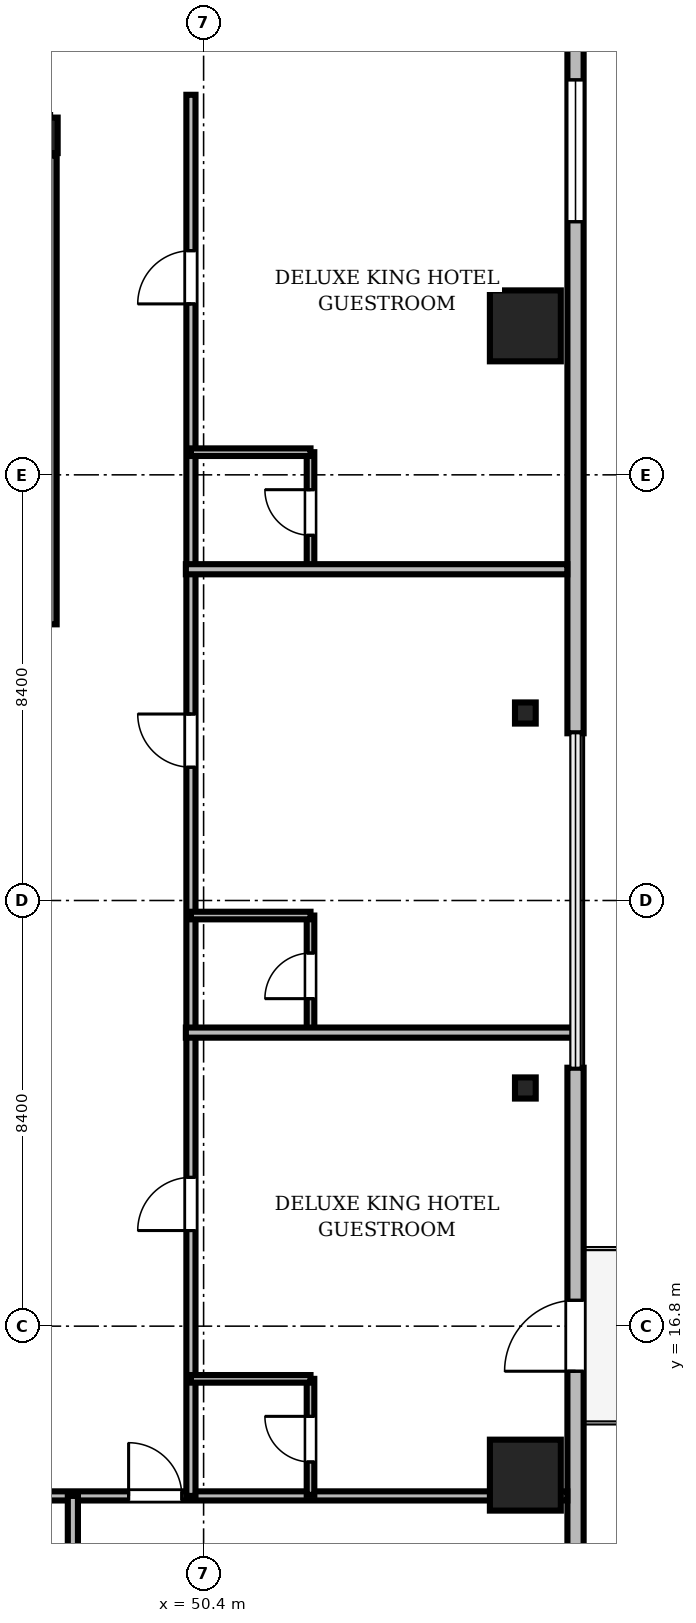
"""IFC4 building model, lengths in metres.
Left out: names, types, materials, properties, quantities, classifications, styles, units other than length and angle.
Written with IfcOpenShell. Run it as: python <this file> out.ifc"""

import sys

from ifc_helpers import new_model, si_unit, direction, frame, frame_2d, origin, origin_2d, place, context, subcontext, project, spatial, rectangle, i_section, extrude, source, transform, mapped, element, fill, save


model = new_model("IFC4")
c1 = context("Model", 3, precision=1e-05, world=origin(), true_north=direction((0.0, 1.0)))
c2 = subcontext(c1, "Body", "Model", "MODEL_VIEW")
j1 = project(units=[si_unit("LENGTHUNIT", "METRE"), si_unit("PLANEANGLEUNIT", "RADIAN")], contexts=[c1])
p1 = place(None, origin())
s1 = spatial("IfcSite", under=j1, at=p1, CompositionType="ELEMENT")
p2 = place(p1, origin())
s2 = spatial("IfcBuilding", under=s1, at=p2, CompositionType="ELEMENT")
p3 = place(p2, frame((0.0, 0.0, 203.55)))
s3 = spatial("IfcBuildingStorey", under=s2, at=p3, CompositionType="ELEMENT", Elevation=203.55)
m1 = source(origin(), c2, "Body", "SweptSolid", [
    extrude(i_section(OverallWidth=0.3, OverallDepth=0.7, WebThickness=0.017, FlangeThickness=0.032, FilletRadius=0.027, at=origin_2d()), origin(), (0.0, 0.0, 1.0), 3.53),
])
p4 = place(p3, frame((47.37, 40.3, 0.0), z_axis=(0.0, 0.0, 1.0), x_axis=(1.0, 0.0, 0.0)))
e1 = element("IfcColumn", 1, at=p4, inside=s3, PredefinedType="COLUMN", context=c2, shape_type="MappedRepresentation", body=[
    mapped(m1, transform((0.0, 0.0, 0.0), scale=1.0)),
])
m2 = source(origin(), c2, "Body", "SweptSolid", [
    extrude(rectangle(XDim=1.4, YDim=1.4, at=origin_2d()), origin(), (0.0, 0.0, 1.0), 3.53),
])
for number, where, z_axis, x_axis in (
    (2, (56.75, 13.86, 0.0), (0.0, 0.0, 1.0), (1.0, 0.0, 0.0)),
    (3, (56.75, 36.54, 0.0), (0.0, 0.0, 1.0), (1.0, 0.0, 0.0)),
):
    element("IfcColumn", number, at=place(p3, frame(where, z_axis=z_axis, x_axis=x_axis)), inside=s3, PredefinedType="COLUMN", context=c2, shape_type="MappedRepresentation", body=[
        mapped(m2, transform((0.0, 0.0, 0.0), scale=1.0)),
    ])
m3 = source(origin(), c2, "Body", "SweptSolid", [
    extrude(i_section(OverallWidth=0.409, OverallDepth=0.417, WebThickness=0.021, FlangeThickness=0.033, FilletRadius=0.015, at=origin_2d()), origin(), (0.0, 0.0, 1.0), 3.53),
])
for number, where, z_axis, x_axis in (
    (4, (56.75, 21.5, 0.0), (0.0, 0.0, 1.0), (1.0, 0.0, 0.0)),
    (5, (56.75, 28.9, 0.0), (0.0, 0.0, 1.0), (1.0, 0.0, 0.0)),
):
    element("IfcColumn", number, at=place(p3, frame(where, z_axis=z_axis, x_axis=x_axis)), inside=s3, PredefinedType="COLUMN", context=c2, shape_type="MappedRepresentation", body=[
        mapped(m3, transform((0.0, 0.0, 0.0), scale=1.0)),
    ])
m4 = source(origin(), c2, "Body", "SweptSolid", [
    extrude(rectangle(XDim=15.6, YDim=0.32, at=frame_2d((7.8, 0.0))), origin(), (0.0, 0.0, 1.0), 3.53),
])
p5 = place(p3, frame((57.74, 6.3, 0.0), z_axis=(0.0, 0.0, 1.0), x_axis=(0.0, 1.0, 0.0)))
e6 = element("IfcWall", 6, at=p5, inside=s3, PredefinedType="SOLIDWALL", context=c2, shape_type="MappedRepresentation", body=[
    mapped(m4, transform((0.0, 0.0, 0.0), scale=1.0)),
])
m5 = source(origin(), c2, "Body", "SweptSolid", [
    extrude(rectangle(XDim=1.4, YDim=2.3, at=frame_2d((0.7, 1.15))), frame((0.0, 0.17, 0.0), z_axis=(0.0, -1.0, 0.0), x_axis=(1.0, 0.0, 0.0)), (0.0, 0.0, 1.0), 0.34),
])
p6 = place(p5, frame((9.61, 0.0, 0.0)))
e7 = element("IfcOpeningElement", 7, at=p6, cuts=e6, PredefinedType="OPENING", context=c2, shape_type="MappedRepresentation", body=[
    mapped(m5, transform((0.0, 0.0, 0.0), scale=1.0)),
])
m6 = source(origin(), c2, "Body", "SweptSolid", [
    extrude(rectangle(XDim=2.8, YDim=2.4, at=frame_2d((1.4, 1.2))), frame((0.0, 0.17, 0.0), z_axis=(0.0, -1.0, 0.0), x_axis=(1.0, 0.0, 0.0)), (0.0, 0.0, 1.0), 0.34),
])
p7 = place(p5, frame((2.705, 0.0, 0.72)))
e8 = element("IfcOpeningElement", 8, at=p7, cuts=e6, PredefinedType="OPENING", context=c2, shape_type="MappedRepresentation", body=[
    mapped(m6, transform((0.0, 0.0, 0.0), scale=1.0)),
])
m7 = source(origin(), c2, "Body", "SweptSolid", [
    extrude(rectangle(XDim=15.6, YDim=0.32, at=frame_2d((7.8, 0.0))), origin(), (0.0, 0.0, 1.0), 3.53),
])
p8 = place(p3, frame((57.74, 28.5, 0.0), z_axis=(0.0, 0.0, 1.0), x_axis=(0.0, 1.0, 0.0)))
e9 = element("IfcWall", 9, at=p8, inside=s3, PredefinedType="SOLIDWALL", context=c2, shape_type="MappedRepresentation", body=[
    mapped(m7, transform((0.0, 0.0, 0.0), scale=1.0)),
])
p9 = place(p8, frame((10.095, 0.0, 0.72)))
e10 = element("IfcOpeningElement", 10, at=p9, cuts=e9, PredefinedType="OPENING", context=c2, shape_type="MappedRepresentation", body=[
    mapped(m6, transform((0.0, 0.0, 0.0), scale=1.0)),
])
m8 = source(origin(), c2, "Body", "SweptSolid", [
    extrude(rectangle(XDim=9.25, YDim=0.25, at=frame_2d((4.625, 0.0))), origin(), (0.0, 0.0, 1.0), 3.55),
])
p10 = place(p3, frame((47.375, 30.65, 0.0), z_axis=(0.0, 0.0, 1.0), x_axis=(0.0, 1.0, 0.0)))
e11 = element("IfcWall", 11, at=p10, inside=s3, PredefinedType="SOLIDWALL", context=c2, shape_type="MappedRepresentation", body=[
    mapped(m8, transform((0.0, 0.0, 0.0), scale=1.0)),
])
m9 = source(origin(), c2, "Body", "SweptSolid", [
    extrude(rectangle(XDim=46.156, YDim=0.18, at=frame_2d((23.078, 0.0))), origin(), (0.0, 0.0, 1.0), 2.772),
])
p11 = place(p3, frame((11.422, 13.45, 0.0), z_axis=(0.0, 0.0, 1.0), x_axis=(1.0, 0.0, 0.0)))
e12 = element("IfcWall", 12, at=p11, inside=s3, PredefinedType="PARTITIONING", context=c2, shape_type="MappedRepresentation", body=[
    mapped(m9, transform((0.0, 0.0, 0.0), scale=1.0)),
])
m10 = source(origin(), c2, "Body", "SweptSolid", [
    extrude(rectangle(XDim=1.05, YDim=2.2, at=frame_2d((0.525, 1.1))), frame((0.0, 0.1, 0.0), z_axis=(0.0, -1.0, 0.0), x_axis=(1.0, 0.0, 0.0)), (0.0, 0.0, 1.0), 0.2),
])
p12 = place(p11, frame((11.118, 0.0, 0.0)))
e13 = element("IfcOpeningElement", 13, at=p12, cuts=e12, PredefinedType="OPENING", context=c2, shape_type="MappedRepresentation", body=[
    mapped(m10, transform((0.0, 0.0, 0.0), scale=1.0)),
])
p13 = place(p11, frame((14.939, 0.0, 0.0)))
e14 = element("IfcOpeningElement", 14, at=p13, cuts=e12, PredefinedType="OPENING", context=c2, shape_type="MappedRepresentation", body=[
    mapped(m10, transform((0.0, 0.0, 0.0), scale=1.0)),
])
p14 = place(p11, frame((20.922, 0.0, 0.0)))
e15 = element("IfcOpeningElement", 15, at=p14, cuts=e12, PredefinedType="OPENING", context=c2, shape_type="MappedRepresentation", body=[
    mapped(m10, transform((0.0, 0.0, 0.0), scale=1.0)),
])
p15 = place(p11, frame((26.904, 0.0, 0.0)))
e16 = element("IfcOpeningElement", 16, at=p15, cuts=e12, PredefinedType="OPENING", context=c2, shape_type="MappedRepresentation", body=[
    mapped(m10, transform((0.0, 0.0, 0.0), scale=1.0)),
])
p16 = place(p11, frame((32.887, 0.0, 0.0)))
e17 = element("IfcOpeningElement", 17, at=p16, cuts=e12, PredefinedType="OPENING", context=c2, shape_type="MappedRepresentation", body=[
    mapped(m10, transform((0.0, 0.0, 0.0), scale=1.0)),
])
p17 = place(p11, frame((37.498, 0.0, 0.0)))
e18 = element("IfcOpeningElement", 18, at=p17, cuts=e12, PredefinedType="OPENING", context=c2, shape_type="MappedRepresentation", body=[
    mapped(m10, transform((0.0, 0.0, 0.0), scale=1.0)),
])
m11 = source(origin(), c2, "Body", "SweptSolid", [
    extrude(rectangle(XDim=27.65, YDim=0.18, at=frame_2d((13.825, 0.0))), origin(), (0.0, 0.0, 1.0), 2.972),
])
p18 = place(p3, frame((50.15, 13.45, 0.0), z_axis=(0.0, 0.0, 1.0), x_axis=(0.0, 1.0, 0.0)))
e19 = element("IfcWall", 19, at=p18, inside=s3, PredefinedType="PARTITIONING", context=c2, shape_type="MappedRepresentation", body=[
    mapped(m11, transform((0.0, 0.0, 0.0), scale=1.0)),
])
p19 = place(p18, frame((5.237, 0.0, 0.0)))
e20 = element("IfcOpeningElement", 20, at=p19, cuts=e19, PredefinedType="OPENING", context=c2, shape_type="MappedRepresentation", body=[
    mapped(m10, transform((0.0, 0.0, 0.0), scale=1.0)),
])
p20 = place(p18, frame((14.38, 0.0, 0.0)))
e21 = element("IfcOpeningElement", 21, at=p20, cuts=e19, PredefinedType="OPENING", context=c2, shape_type="MappedRepresentation", body=[
    mapped(m10, transform((0.0, 0.0, 0.0), scale=1.0)),
])
p21 = place(p18, frame((23.523, 0.0, 0.0)))
e22 = element("IfcOpeningElement", 22, at=p21, cuts=e19, PredefinedType="OPENING", context=c2, shape_type="MappedRepresentation", body=[
    mapped(m10, transform((0.0, 0.0, 0.0), scale=1.0)),
])
m12 = source(origin(), c2, "Body", "SweptSolid", [
    extrude(rectangle(XDim=2.29, YDim=0.15, at=frame_2d((1.145, 0.0))), origin(), (0.0, 0.0, 1.0), 2.972),
])
p22 = place(p3, frame((52.51, 13.47, 0.0), z_axis=(0.0, 0.0, 1.0), x_axis=(0.0, 1.0, 0.0)))
e23 = element("IfcWall", 23, at=p22, inside=s3, PredefinedType="PARTITIONING", context=c2, shape_type="MappedRepresentation", body=[
    mapped(m12, transform((0.0, 0.0, 0.0), scale=1.0)),
])
m13 = source(origin(), c2, "Body", "SweptSolid", [
    extrude(rectangle(XDim=0.9, YDim=2.1, at=frame_2d((0.45, 1.05))), frame((0.0, 0.085, 0.0), z_axis=(0.0, -1.0, 0.0), x_axis=(1.0, 0.0, 0.0)), (0.0, 0.0, 1.0), 0.17),
])
p23 = place(p22, frame((0.65, 0.0, 0.0)))
e24 = element("IfcOpeningElement", 24, at=p23, cuts=e23, PredefinedType="OPENING", context=c2, shape_type="MappedRepresentation", body=[
    mapped(m13, transform((0.0, 0.0, 0.0), scale=1.0)),
])
m14 = source(origin(), c2, "Body", "SweptSolid", [
    extrude(rectangle(XDim=2.29, YDim=0.15, at=frame_2d((1.145, 0.0))), origin(), (0.0, 0.0, 1.0), 3.192),
])
p24 = place(p3, frame((52.51, 22.613, 0.0), z_axis=(0.0, 0.0, 1.0), x_axis=(0.0, 1.0, 0.0)))
e25 = element("IfcWall", 25, at=p24, inside=s3, PredefinedType="PARTITIONING", context=c2, shape_type="MappedRepresentation", body=[
    mapped(m14, transform((0.0, 0.0, 0.0), scale=1.0)),
])
p25 = place(p24, frame((0.65, 0.0, 0.0)))
e26 = element("IfcOpeningElement", 26, at=p25, cuts=e25, PredefinedType="OPENING", context=c2, shape_type="MappedRepresentation", body=[
    mapped(m13, transform((0.0, 0.0, 0.0), scale=1.0)),
])
m15 = source(origin(), c2, "Body", "SweptSolid", [
    extrude(rectangle(XDim=2.29, YDim=0.15, at=frame_2d((1.145, 0.0))), origin(), (0.0, 0.0, 1.0), 3.53),
])
p26 = place(p3, frame((52.51, 31.757, 0.0), z_axis=(0.0, 0.0, 1.0), x_axis=(0.0, 1.0, 0.0)))
e27 = element("IfcWall", 27, at=p26, inside=s3, PredefinedType="PARTITIONING", context=c2, shape_type="MappedRepresentation", body=[
    mapped(m15, transform((0.0, 0.0, 0.0), scale=1.0)),
])
p27 = place(p26, frame((0.65, 0.0, 0.0)))
e28 = element("IfcOpeningElement", 28, at=p27, cuts=e27, PredefinedType="OPENING", context=c2, shape_type="MappedRepresentation", body=[
    mapped(m13, transform((0.0, 0.0, 0.0), scale=1.0)),
])
m16 = source(origin(), c2, "Body", "SweptSolid", [
    extrude(rectangle(XDim=11.328, YDim=0.2, at=frame_2d((5.664, 0.0))), origin(), (0.0, 0.0, 1.0), 2.772),
])
p28 = place(p3, frame((47.82, 2.122, 0.0), z_axis=(0.0, 0.0, 1.0), x_axis=(0.0, 1.0, 0.0)))
e29 = element("IfcWall", 29, at=p28, inside=s3, PredefinedType="PARTITIONING", context=c2, shape_type="MappedRepresentation", body=[
    mapped(m16, transform((0.0, 0.0, 0.0), scale=1.0)),
])
m17 = source(origin(), c2, "Body", "SweptSolid", [
    extrude(rectangle(XDim=7.72, YDim=0.2, at=frame_2d((3.86, 0.0))), origin(), (0.0, 0.0, 1.0), 2.772),
])
p29 = place(p3, frame((50.05, 22.593, 0.0), z_axis=(0.0, 0.0, 1.0), x_axis=(1.0, 0.0, 0.0)))
e30 = element("IfcWall", 30, at=p29, inside=s3, PredefinedType="PARTITIONING", context=c2, shape_type="MappedRepresentation", body=[
    mapped(m17, transform((0.0, 0.0, 0.0), scale=1.0)),
])
m18 = source(origin(), c2, "Body", "SweptSolid", [
    extrude(rectangle(XDim=7.528, YDim=0.2, at=frame_2d((3.764, 0.0))), origin(), (0.0, 0.0, 1.0), 2.772),
])
p30 = place(p3, frame((50.05, 31.737, 0.0), z_axis=(0.0, 0.0, 1.0), x_axis=(1.0, 0.0, 0.0)))
e31 = element("IfcWall", 31, at=p30, inside=s3, PredefinedType="PARTITIONING", context=c2, shape_type="MappedRepresentation", body=[
    mapped(m18, transform((0.0, 0.0, 0.0), scale=1.0)),
])
m19 = source(origin(), c2, "Body", "SweptSolid", [
    extrude(rectangle(XDim=2.36, YDim=0.15, at=frame_2d((1.18, 0.0))), origin(), (0.0, 0.0, 1.0), 3.53),
])
for number, where, z_axis, x_axis in (
    (32, (50.15, 15.76, 0.0), (0.0, 0.0, 1.0), (1.0, 0.0, 0.0)),
    (33, (50.15, 24.903, 0.0), (0.0, 0.0, 1.0), (1.0, 0.0, 0.0)),
    (34, (50.15, 34.047, 0.0), (0.0, 0.0, 1.0), (1.0, 0.0, 0.0)),
):
    element("IfcWall", number, at=place(p3, frame(where, z_axis=z_axis, x_axis=x_axis)), inside=s3, PredefinedType="PARTITIONING", context=c2, shape_type="MappedRepresentation", body=[
        mapped(m19, transform((0.0, 0.0, 0.0), scale=1.0)),
    ])
m20 = source(origin(), c2, "Body", "SweptSolid", [
    extrude(rectangle(XDim=1.4, YDim=2.3, at=frame_2d((0.7, 1.15))), frame((0.0, 0.025, 0.0), z_axis=(0.0, -1.0, 0.0), x_axis=(1.0, 0.0, 0.0)), (0.0, 0.0, 1.0), 0.05),
])
p31 = place(p6, frame((1.4, 0.0, 0.0), z_axis=(0.0, 0.0, 1.0), x_axis=(-1.0, 0.0, 0.0)))
e35 = element("IfcDoor", 35, at=p31, inside=s3, OperationType="DOUBLE_DOOR_SLIDING", PredefinedType="DOOR", context=c2, shape_type="MappedRepresentation", body=[
    mapped(m20, transform((0.0, 0.0, 0.0), scale=1.0)),
])
fill(e7, e35)
m21 = source(origin(), c2, "Body", "SweptSolid", [
    extrude(rectangle(XDim=2.8, YDim=2.4, at=frame_2d((1.4, 1.2))), frame((0.0, 0.03, 0.0), z_axis=(0.0, -1.0, 0.0), x_axis=(1.0, 0.0, 0.0)), (0.0, 0.0, 1.0), 0.06),
])
p32 = place(p9, origin())
e36 = element("IfcWindow", 36, at=p32, inside=s3, PartitioningType="SINGLE_PANEL", PredefinedType="WINDOW", context=c2, shape_type="MappedRepresentation", body=[
    mapped(m21, transform((0.0, 0.0, 0.0), scale=1.0)),
])
fill(e10, e36)
m22 = source(origin(), c2, "Body", "SweptSolid", [
    extrude(rectangle(XDim=1.05, YDim=2.2, at=frame_2d((0.525, 1.1))), frame((0.0, 0.025, 0.0), z_axis=(0.0, -1.0, 0.0), x_axis=(1.0, 0.0, 0.0)), (0.0, 0.0, 1.0), 0.05),
])
p33 = place(p17, origin())
e37 = element("IfcDoor", 37, at=p33, inside=s3, OperationType="SINGLE_SWING_LEFT", PredefinedType="DOOR", context=c2, shape_type="MappedRepresentation", body=[
    mapped(m22, transform((0.0, 0.0, 0.0), scale=1.0)),
])
fill(e18, e37)
p34 = place(p19, origin())
e38 = element("IfcDoor", 38, at=p34, inside=s3, OperationType="SINGLE_SWING_LEFT", PredefinedType="DOOR", context=c2, shape_type="MappedRepresentation", body=[
    mapped(m22, transform((0.0, 0.0, 0.0), scale=1.0)),
])
fill(e20, e38)
p35 = place(p20, origin())
e39 = element("IfcDoor", 39, at=p35, inside=s3, OperationType="SINGLE_SWING_RIGHT", PredefinedType="DOOR", context=c2, shape_type="MappedRepresentation", body=[
    mapped(m22, transform((0.0, 0.0, 0.0), scale=1.0)),
])
fill(e21, e39)
p36 = place(p21, origin())
e40 = element("IfcDoor", 40, at=p36, inside=s3, OperationType="SINGLE_SWING_LEFT", PredefinedType="DOOR", context=c2, shape_type="MappedRepresentation", body=[
    mapped(m22, transform((0.0, 0.0, 0.0), scale=1.0)),
])
fill(e22, e40)
m23 = source(origin(), c2, "Body", "SweptSolid", [
    extrude(rectangle(XDim=0.9, YDim=2.1, at=frame_2d((0.45, 1.05))), frame((0.0, 0.025, 0.0), z_axis=(0.0, -1.0, 0.0), x_axis=(1.0, 0.0, 0.0)), (0.0, 0.0, 1.0), 0.05),
])
p37 = place(p23, origin())
e41 = element("IfcDoor", 41, at=p37, inside=s3, OperationType="SINGLE_SWING_RIGHT", PredefinedType="DOOR", context=c2, shape_type="MappedRepresentation", body=[
    mapped(m23, transform((0.0, 0.0, 0.0), scale=1.0)),
])
fill(e24, e41)
p38 = place(p25, origin())
e42 = element("IfcDoor", 42, at=p38, inside=s3, OperationType="SINGLE_SWING_LEFT", PredefinedType="DOOR", context=c2, shape_type="MappedRepresentation", body=[
    mapped(m23, transform((0.0, 0.0, 0.0), scale=1.0)),
])
fill(e26, e42)
p39 = place(p27, origin())
e43 = element("IfcDoor", 43, at=p39, inside=s3, OperationType="SINGLE_SWING_RIGHT", PredefinedType="DOOR", context=c2, shape_type="MappedRepresentation", body=[
    mapped(m23, transform((0.0, 0.0, 0.0), scale=1.0)),
])
fill(e28, e43)
save(model, sys.argv[1])
